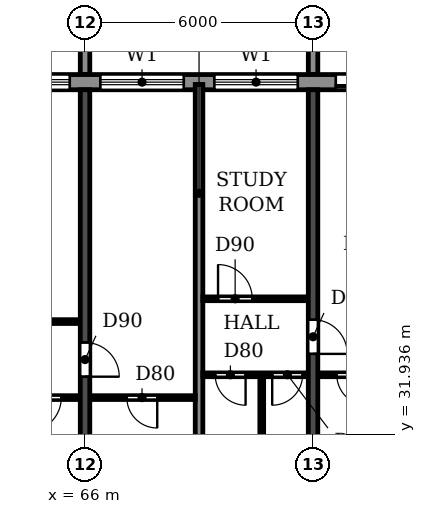
"""IFC4 building model, lengths in metres.
Left out: names, types, materials, properties, quantities, classifications, styles, units other than length and angle.
Written with IfcOpenShell. Run it as: python <this file> out.ifc"""

import sys

from ifc_helpers import new_model, si_unit, direction, frame, frame_2d, origin, place, context, subcontext, project, spatial, polyline, rectangle, outline, extrude, source, transform, mapped, element, fill, save


model = new_model("IFC4")
c1 = context("Model", 3, precision=1e-05, world=origin(), true_north=direction((0.0, 1.0)))
c2 = subcontext(c1, "Body", "Model", "MODEL_VIEW")
j1 = project(units=[si_unit("LENGTHUNIT", "METRE"), si_unit("PLANEANGLEUNIT", "RADIAN")], contexts=[c1])
p1 = place(None, origin())
s1 = spatial("IfcSite", under=j1, at=p1, CompositionType="ELEMENT")
p2 = place(p1, origin())
s2 = spatial("IfcBuilding", under=s1, at=p2, CompositionType="ELEMENT")
p3 = place(p2, frame((0.0, 0.0, 208.2)))
s3 = spatial("IfcBuildingStorey", under=s2, at=p3, CompositionType="ELEMENT", Elevation=208.2)
p4 = place(p3, frame((66.0, 30.5, 0.0), z_axis=(0.0, 0.0, 1.0), x_axis=(0.0, 1.0, 0.0)))
e1 = element("IfcWall", 1, at=p4, inside=s3, PredefinedType="SHEAR", context=c2, shape_type="SweptSolid", body=[
    extrude(rectangle(XDim=10.5, YDim=0.25, at=frame_2d((5.25, 0.0))), origin(), (0.0, 0.0, 1.0), 3.0),
])
p5 = place(p4, frame((2.95, 0.0, 0.0)))
e2 = element("IfcOpeningElement", 2, at=p5, cuts=e1, PredefinedType="OPENING", context=c2, shape_type="SweptSolid", body=[
    extrude(rectangle(XDim=0.9, YDim=2.1, at=frame_2d((0.45, 1.05))), frame((0.0, 0.135, 0.0), z_axis=(0.0, -1.0, 0.0), x_axis=(1.0, 0.0, 0.0)), (0.0, 0.0, 1.0), 0.27),
])
p6 = place(p3, frame((72.0, 30.5, 0.0), z_axis=(0.0, 0.0, 1.0), x_axis=(0.0, 1.0, 0.0)))
e3 = element("IfcWall", 3, at=p6, inside=s3, PredefinedType="SHEAR", context=c2, shape_type="SweptSolid", body=[
    extrude(rectangle(XDim=10.5, YDim=0.25, at=frame_2d((5.25, 0.0))), origin(), (0.0, 0.0, 1.0), 3.0),
])
p7 = place(p6, frame((3.55, 0.0, 0.0)))
e4 = element("IfcOpeningElement", 4, at=p7, cuts=e3, PredefinedType="OPENING", context=c2, shape_type="SweptSolid", body=[
    extrude(rectangle(XDim=0.9, YDim=2.1, at=frame_2d((0.45, 1.05))), frame((0.0, 0.135, 0.0), z_axis=(0.0, -1.0, 0.0), x_axis=(1.0, 0.0, 0.0)), (0.0, 0.0, 1.0), 0.27),
])
p8 = place(p3, frame((79.317, 41.2, 0.0), z_axis=(0.0, 0.0, 1.0), x_axis=(-1.0, 0.0, 0.0)))
e5 = element("IfcWall", 5, at=p8, inside=s3, PredefinedType="STANDARD", context=c2, shape_type="SweptSolid", body=[
    extrude(rectangle(XDim=56.634, YDim=0.4, at=frame_2d((28.317, 0.0))), origin(), (0.0, 0.0, 1.0), 3.0),
])
p9 = place(p8, frame((52.717, 0.0, 0.9)))
e6 = element("IfcOpeningElement", 6, at=p9, cuts=e5, PredefinedType="OPENING", context=c2, shape_type="SweptSolid", body=[
    extrude(rectangle(XDim=2.2, YDim=1.5, at=frame_2d((1.1, 0.75))), frame((0.0, 0.21, 0.0), z_axis=(0.0, -1.0, 0.0), x_axis=(1.0, 0.0, 0.0)), (0.0, 0.0, 1.0), 0.42),
])
p10 = place(p8, frame((49.917, 0.0, 0.0)))
e7 = element("IfcOpeningElement", 7, at=p10, cuts=e5, PredefinedType="OPENING", context=c2, shape_type="SweptSolid", body=[
    extrude(rectangle(XDim=1.8, YDim=2.4, at=frame_2d((0.9, 1.2))), frame((0.0, 0.21, 0.0), z_axis=(0.0, -1.0, 0.0), x_axis=(1.0, 0.0, 0.0)), (0.0, 0.0, 1.0), 0.42),
])
p11 = place(p8, frame((46.717, 0.0, 0.9)))
e8 = element("IfcOpeningElement", 8, at=p11, cuts=e5, PredefinedType="OPENING", context=c2, shape_type="SweptSolid", body=[
    extrude(rectangle(XDim=2.2, YDim=1.5, at=frame_2d((1.1, 0.75))), frame((0.0, 0.21, 0.0), z_axis=(0.0, -1.0, 0.0), x_axis=(1.0, 0.0, 0.0)), (0.0, 0.0, 1.0), 0.42),
])
p12 = place(p8, frame((43.917, 0.0, 0.0)))
e9 = element("IfcOpeningElement", 9, at=p12, cuts=e5, PredefinedType="OPENING", context=c2, shape_type="SweptSolid", body=[
    extrude(rectangle(XDim=1.8, YDim=2.4, at=frame_2d((0.9, 1.2))), frame((0.0, 0.21, 0.0), z_axis=(0.0, -1.0, 0.0), x_axis=(1.0, 0.0, 0.0)), (0.0, 0.0, 1.0), 0.42),
])
p13 = place(p8, frame((40.917, 0.0, 0.0)))
e10 = element("IfcOpeningElement", 10, at=p13, cuts=e5, PredefinedType="OPENING", context=c2, shape_type="SweptSolid", body=[
    extrude(rectangle(XDim=1.8, YDim=2.4, at=frame_2d((0.9, 1.2))), frame((0.0, 0.21, 0.0), z_axis=(0.0, -1.0, 0.0), x_axis=(1.0, 0.0, 0.0)), (0.0, 0.0, 1.0), 0.42),
])
p14 = place(p8, frame((37.717, 0.0, 0.9)))
e11 = element("IfcOpeningElement", 11, at=p14, cuts=e5, PredefinedType="OPENING", context=c2, shape_type="SweptSolid", body=[
    extrude(rectangle(XDim=2.2, YDim=1.5, at=frame_2d((1.1, 0.75))), frame((0.0, 0.21, 0.0), z_axis=(0.0, -1.0, 0.0), x_axis=(1.0, 0.0, 0.0)), (0.0, 0.0, 1.0), 0.42),
])
p15 = place(p8, frame((34.717, 0.0, 0.9)))
e12 = element("IfcOpeningElement", 12, at=p15, cuts=e5, PredefinedType="OPENING", context=c2, shape_type="SweptSolid", body=[
    extrude(rectangle(XDim=2.2, YDim=1.5, at=frame_2d((1.1, 0.75))), frame((0.0, 0.21, 0.0), z_axis=(0.0, -1.0, 0.0), x_axis=(1.0, 0.0, 0.0)), (0.0, 0.0, 1.0), 0.42),
])
p16 = place(p8, frame((31.717, 0.0, 0.9)))
e13 = element("IfcOpeningElement", 13, at=p16, cuts=e5, PredefinedType="OPENING", context=c2, shape_type="SweptSolid", body=[
    extrude(rectangle(XDim=2.2, YDim=1.5, at=frame_2d((1.1, 0.75))), frame((0.0, 0.21, 0.0), z_axis=(0.0, -1.0, 0.0), x_axis=(1.0, 0.0, 0.0)), (0.0, 0.0, 1.0), 0.42),
])
p17 = place(p8, frame((28.717, 0.0, 0.9)))
e14 = element("IfcOpeningElement", 14, at=p17, cuts=e5, PredefinedType="OPENING", context=c2, shape_type="SweptSolid", body=[
    extrude(rectangle(XDim=2.2, YDim=1.5, at=frame_2d((1.1, 0.75))), frame((0.0, 0.21, 0.0), z_axis=(0.0, -1.0, 0.0), x_axis=(1.0, 0.0, 0.0)), (0.0, 0.0, 1.0), 0.42),
])
p18 = place(p8, frame((25.917, 0.0, 0.0)))
e15 = element("IfcOpeningElement", 15, at=p18, cuts=e5, PredefinedType="OPENING", context=c2, shape_type="SweptSolid", body=[
    extrude(rectangle(XDim=1.8, YDim=2.4, at=frame_2d((0.9, 1.2))), frame((0.0, 0.21, 0.0), z_axis=(0.0, -1.0, 0.0), x_axis=(1.0, 0.0, 0.0)), (0.0, 0.0, 1.0), 0.42),
])
p19 = place(p8, frame((22.717, 0.0, 0.9)))
e16 = element("IfcOpeningElement", 16, at=p19, cuts=e5, PredefinedType="OPENING", context=c2, shape_type="SweptSolid", body=[
    extrude(rectangle(XDim=2.2, YDim=1.5, at=frame_2d((1.1, 0.75))), frame((0.0, 0.21, 0.0), z_axis=(0.0, -1.0, 0.0), x_axis=(1.0, 0.0, 0.0)), (0.0, 0.0, 1.0), 0.42),
])
p20 = place(p8, frame((19.717, 0.0, 0.9)))
e17 = element("IfcOpeningElement", 17, at=p20, cuts=e5, PredefinedType="OPENING", context=c2, shape_type="SweptSolid", body=[
    extrude(rectangle(XDim=2.2, YDim=1.5, at=frame_2d((1.1, 0.75))), frame((0.0, 0.21, 0.0), z_axis=(0.0, -1.0, 0.0), x_axis=(1.0, 0.0, 0.0)), (0.0, 0.0, 1.0), 0.42),
])
p21 = place(p8, frame((16.917, 0.0, 0.0)))
e18 = element("IfcOpeningElement", 18, at=p21, cuts=e5, PredefinedType="OPENING", context=c2, shape_type="SweptSolid", body=[
    extrude(rectangle(XDim=1.8, YDim=2.4, at=frame_2d((0.9, 1.2))), frame((0.0, 0.21, 0.0), z_axis=(0.0, -1.0, 0.0), x_axis=(1.0, 0.0, 0.0)), (0.0, 0.0, 1.0), 0.42),
])
p22 = place(p8, frame((13.717, 0.0, 0.9)))
e19 = element("IfcOpeningElement", 19, at=p22, cuts=e5, PredefinedType="OPENING", context=c2, shape_type="SweptSolid", body=[
    extrude(rectangle(XDim=2.2, YDim=1.5, at=frame_2d((1.1, 0.75))), frame((0.0, 0.21, 0.0), z_axis=(0.0, -1.0, 0.0), x_axis=(1.0, 0.0, 0.0)), (0.0, 0.0, 1.0), 0.42),
])
p23 = place(p8, frame((10.717, 0.0, 0.9)))
e20 = element("IfcOpeningElement", 20, at=p23, cuts=e5, PredefinedType="OPENING", context=c2, shape_type="SweptSolid", body=[
    extrude(rectangle(XDim=2.2, YDim=1.5, at=frame_2d((1.1, 0.75))), frame((0.0, 0.21, 0.0), z_axis=(0.0, -1.0, 0.0), x_axis=(1.0, 0.0, 0.0)), (0.0, 0.0, 1.0), 0.42),
])
p24 = place(p8, frame((7.717, 0.0, 0.9)))
e21 = element("IfcOpeningElement", 21, at=p24, cuts=e5, PredefinedType="OPENING", context=c2, shape_type="SweptSolid", body=[
    extrude(rectangle(XDim=2.2, YDim=1.5, at=frame_2d((1.1, 0.75))), frame((0.0, 0.21, 0.0), z_axis=(0.0, -1.0, 0.0), x_axis=(1.0, 0.0, 0.0)), (0.0, 0.0, 1.0), 0.42),
])
p25 = place(p8, frame((4.917, 0.0, 0.0)))
e22 = element("IfcOpeningElement", 22, at=p25, cuts=e5, PredefinedType="OPENING", context=c2, shape_type="SweptSolid", body=[
    extrude(rectangle(XDim=1.8, YDim=2.4, at=frame_2d((0.9, 1.2))), frame((0.0, 0.21, 0.0), z_axis=(0.0, -1.0, 0.0), x_axis=(1.0, 0.0, 0.0)), (0.0, 0.0, 1.0), 0.42),
])
p26 = place(p8, frame((1.717, 0.0, 0.9)))
e23 = element("IfcOpeningElement", 23, at=p26, cuts=e5, PredefinedType="OPENING", context=c2, shape_type="SweptSolid", body=[
    extrude(rectangle(XDim=2.2, YDim=1.5, at=frame_2d((1.1, 0.75))), frame((0.0, 0.21, 0.0), z_axis=(0.0, -1.0, 0.0), x_axis=(1.0, 0.0, 0.0)), (0.0, 0.0, 1.0), 0.42),
])
m1 = source(origin(), c2, "Body", "SweptSolid", [
    extrude(outline(polyline([(0.0, 0.0), (0.25, 0.0), (0.25, 3.1), (0.0, 3.1), (0.0, 0.0)])), origin(), (0.0, 0.0, 1.0), 3.1),
])
for number, where in (
    (24, (65.875, 41.4, 0.0)),
    (25, (71.875, 41.4, 0.0)),
):
    element("IfcWall", number, at=place(p3, frame(where)), inside=s3, PredefinedType="STANDARD", context=c2, shape_type="MappedRepresentation", body=[
        mapped(m1, transform((0.0, 0.0, 0.0))),
    ])
p27 = place(p3, frame((69.0, 30.51, 0.0), z_axis=(0.0, 0.0, 1.0), x_axis=(0.0, 1.0, 0.0)))
e26 = element("IfcWall", 26, at=p27, inside=s3, PredefinedType="PARTITIONING", context=c2, shape_type="SweptSolid", body=[
    extrude(rectangle(XDim=10.63, YDim=0.2, at=frame_2d((5.315, 0.0))), origin(), (0.0, 0.0, 1.0), 3.0),
])
p28 = place(p3, frame((63.8, 32.9, 0.0), z_axis=(0.0, 0.0, 1.0), x_axis=(1.0, 0.0, 0.0)))
e27 = element("IfcWall", 27, at=p28, inside=s3, PredefinedType="PARTITIONING", context=c2, shape_type="SweptSolid", body=[
    extrude(rectangle(XDim=2.065, YDim=0.1, at=frame_2d((1.032, 0.0))), origin(), (0.0, 0.0, 1.0), 3.0),
])
p29 = place(p28, frame((0.675, 0.0, 0.0)))
e28 = element("IfcOpeningElement", 28, at=p29, cuts=e27, PredefinedType="OPENING", context=c2, shape_type="SweptSolid", body=[
    extrude(rectangle(XDim=0.9, YDim=2.1, at=frame_2d((0.45, 1.05))), frame((0.0, 0.06, 0.0), z_axis=(0.0, -1.0, 0.0), x_axis=(1.0, 0.0, 0.0)), (0.0, 0.0, 1.0), 0.12),
])
p30 = place(p3, frame((66.135, 32.9, 0.0), z_axis=(0.0, 0.0, 1.0), x_axis=(1.0, 0.0, 0.0)))
e29 = element("IfcWall", 29, at=p30, inside=s3, PredefinedType="PARTITIONING", context=c2, shape_type="SweptSolid", body=[
    extrude(rectangle(XDim=2.765, YDim=0.1, at=frame_2d((1.382, 0.0))), origin(), (0.0, 0.0, 1.0), 3.0),
])
p31 = place(p30, frame((0.965, 0.0, 0.0)))
e30 = element("IfcOpeningElement", 30, at=p31, cuts=e29, PredefinedType="OPENING", context=c2, shape_type="SweptSolid", body=[
    extrude(rectangle(XDim=0.8, YDim=2.1, at=frame_2d((0.4, 1.05))), frame((0.0, 0.06, 0.0), z_axis=(0.0, -1.0, 0.0), x_axis=(1.0, 0.0, 0.0)), (0.0, 0.0, 1.0), 0.12),
])
p32 = place(p3, frame((69.1, 33.5, 0.0), z_axis=(0.0, 0.0, 1.0), x_axis=(1.0, 0.0, 0.0)))
e31 = element("IfcWall", 31, at=p32, inside=s3, PredefinedType="PARTITIONING", context=c2, shape_type="SweptSolid", body=[
    extrude(rectangle(XDim=2.765, YDim=0.1, at=frame_2d((1.382, 0.0))), origin(), (0.0, 0.0, 1.0), 3.0),
])
p33 = place(p32, frame((0.325, 0.0, 0.0)))
e32 = element("IfcOpeningElement", 32, at=p33, cuts=e31, PredefinedType="OPENING", context=c2, shape_type="SweptSolid", body=[
    extrude(rectangle(XDim=0.8, YDim=2.1, at=frame_2d((0.4, 1.05))), frame((0.0, 0.06, 0.0), z_axis=(0.0, -1.0, 0.0), x_axis=(1.0, 0.0, 0.0)), (0.0, 0.0, 1.0), 0.12),
])
p34 = place(p32, frame((1.825, 0.0, 0.0)))
e33 = element("IfcOpeningElement", 33, at=p34, cuts=e31, PredefinedType="OPENING", context=c2, shape_type="SweptSolid", body=[
    extrude(rectangle(XDim=0.8, YDim=2.1, at=frame_2d((0.4, 1.05))), frame((0.0, 0.06, 0.0), z_axis=(0.0, -1.0, 0.0), x_axis=(1.0, 0.0, 0.0)), (0.0, 0.0, 1.0), 0.12),
])
p35 = place(p3, frame((72.135, 33.5, 0.0), z_axis=(0.0, 0.0, 1.0), x_axis=(1.0, 0.0, 0.0)))
e34 = element("IfcWall", 34, at=p35, inside=s3, PredefinedType="PARTITIONING", context=c2, shape_type="SweptSolid", body=[
    extrude(rectangle(XDim=1.965, YDim=0.1, at=frame_2d((0.982, 0.0))), origin(), (0.0, 0.0, 1.0), 3.0),
])
p36 = place(p35, frame((0.49, 0.0, 0.0)))
e35 = element("IfcOpeningElement", 35, at=p36, cuts=e34, PredefinedType="OPENING", context=c2, shape_type="SweptSolid", body=[
    extrude(rectangle(XDim=0.8, YDim=2.1, at=frame_2d((0.4, 1.05))), frame((0.0, 0.06, 0.0), z_axis=(0.0, -1.0, 0.0), x_axis=(1.0, 0.0, 0.0)), (0.0, 0.0, 1.0), 0.12),
])
p37 = place(p3, frame((62.95, 34.9, 0.0), z_axis=(0.0, 0.0, 1.0), x_axis=(1.0, 0.0, 0.0)))
e36 = element("IfcWall", 36, at=p37, inside=s3, PredefinedType="PARTITIONING", context=c2, shape_type="SweptSolid", body=[
    extrude(rectangle(XDim=2.915, YDim=0.1, at=frame_2d((1.458, 0.0))), origin(), (0.0, 0.0, 1.0), 3.0),
])
p38 = place(p37, frame((0.55, 0.0, 0.0)))
e37 = element("IfcOpeningElement", 37, at=p38, cuts=e36, PredefinedType="OPENING", context=c2, shape_type="SweptSolid", body=[
    extrude(rectangle(XDim=0.9, YDim=2.1, at=frame_2d((0.45, 1.05))), frame((0.0, 0.06, 0.0), z_axis=(0.0, -1.0, 0.0), x_axis=(1.0, 0.0, 0.0)), (0.0, 0.0, 1.0), 0.12),
])
p39 = place(p3, frame((69.1, 35.5, 0.0), z_axis=(0.0, 0.0, 1.0), x_axis=(1.0, 0.0, 0.0)))
e38 = element("IfcWall", 38, at=p39, inside=s3, PredefinedType="PARTITIONING", context=c2, shape_type="SweptSolid", body=[
    extrude(rectangle(XDim=2.765, YDim=0.1, at=frame_2d((1.382, 0.0))), origin(), (0.0, 0.0, 1.0), 3.0),
])
p40 = place(p39, frame((0.4, 0.0, 0.0)))
e39 = element("IfcOpeningElement", 39, at=p40, cuts=e38, PredefinedType="OPENING", context=c2, shape_type="SweptSolid", body=[
    extrude(rectangle(XDim=0.9, YDim=2.1, at=frame_2d((0.45, 1.05))), frame((0.0, 0.06, 0.0), z_axis=(0.0, -1.0, 0.0), x_axis=(1.0, 0.0, 0.0)), (0.0, 0.0, 1.0), 0.12),
])
p41 = place(p3, frame((70.65, 30.51, 0.0), z_axis=(0.0, 0.0, 1.0), x_axis=(0.0, 1.0, 0.0)))
e40 = element("IfcWall", 40, at=p41, inside=s3, PredefinedType="PARTITIONING", context=c2, shape_type="SweptSolid", body=[
    extrude(rectangle(XDim=2.94, YDim=0.1, at=frame_2d((1.47, 0.0))), origin(), (0.0, 0.0, 1.0), 3.0),
])
p42 = place(p22, origin())
e41 = element("IfcWindow", 41, at=p42, inside=s3, PartitioningType="DOUBLE_PANEL_HORIZONTAL", PredefinedType="WINDOW", context=c2, shape_type="SweptSolid", body=[
    extrude(rectangle(XDim=2.2, YDim=1.5, at=frame_2d((1.1, 0.75))), frame((0.0, 0.03, 0.0), z_axis=(0.0, -1.0, 0.0), x_axis=(1.0, 0.0, 0.0)), (0.0, 0.0, 1.0), 0.06),
])
fill(e19, e41)
p43 = place(p23, origin())
e42 = element("IfcWindow", 42, at=p43, inside=s3, PartitioningType="DOUBLE_PANEL_HORIZONTAL", PredefinedType="WINDOW", context=c2, shape_type="SweptSolid", body=[
    extrude(rectangle(XDim=2.2, YDim=1.5, at=frame_2d((1.1, 0.75))), frame((0.0, 0.03, 0.0), z_axis=(0.0, -1.0, 0.0), x_axis=(1.0, 0.0, 0.0)), (0.0, 0.0, 1.0), 0.06),
])
fill(e20, e42)
p44 = place(p24, origin())
e43 = element("IfcWindow", 43, at=p44, inside=s3, PartitioningType="DOUBLE_PANEL_HORIZONTAL", PredefinedType="WINDOW", context=c2, shape_type="SweptSolid", body=[
    extrude(rectangle(XDim=2.2, YDim=1.5, at=frame_2d((1.1, 0.75))), frame((0.0, 0.03, 0.0), z_axis=(0.0, -1.0, 0.0), x_axis=(1.0, 0.0, 0.0)), (0.0, 0.0, 1.0), 0.06),
])
fill(e21, e43)
p45 = place(p25, origin())
e44 = element("IfcDoor", 44, at=p45, inside=s3, OperationType="DOUBLE_DOOR_SLIDING", PredefinedType="DOOR", context=c2, shape_type="SweptSolid", body=[
    extrude(rectangle(XDim=1.8, YDim=2.4, at=frame_2d((0.9, 1.2))), frame((0.0, 0.025, 0.0), z_axis=(0.0, -1.0, 0.0), x_axis=(1.0, 0.0, 0.0)), (0.0, 0.0, 1.0), 0.05),
])
fill(e22, e44)
p46 = place(p31, frame((0.8, 0.0, 0.0), z_axis=(0.0, 0.0, 1.0), x_axis=(-1.0, 0.0, 0.0)))
e45 = element("IfcDoor", 45, at=p46, inside=s3, OperationType="SINGLE_SWING_LEFT", PredefinedType="DOOR", context=c2, shape_type="SweptSolid", body=[
    extrude(rectangle(XDim=0.8, YDim=2.1, at=frame_2d((0.4, 1.05))), frame((0.0, 0.025, 0.0), z_axis=(0.0, -1.0, 0.0), x_axis=(1.0, 0.0, 0.0)), (0.0, 0.0, 1.0), 0.05),
])
fill(e30, e45)
p47 = place(p29, frame((0.9, 0.0, 0.0), z_axis=(0.0, 0.0, 1.0), x_axis=(-1.0, 0.0, 0.0)))
e46 = element("IfcDoor", 46, at=p47, inside=s3, OperationType="SINGLE_SWING_RIGHT", PredefinedType="DOOR", context=c2, shape_type="SweptSolid", body=[
    extrude(rectangle(XDim=0.9, YDim=2.1, at=frame_2d((0.45, 1.05))), frame((0.0, 0.025, 0.0), z_axis=(0.0, -1.0, 0.0), x_axis=(1.0, 0.0, 0.0)), (0.0, 0.0, 1.0), 0.05),
])
fill(e28, e46)
p48 = place(p5, frame((0.9, 0.0, 0.0), z_axis=(0.0, 0.0, 1.0), x_axis=(-1.0, 0.0, 0.0)))
e47 = element("IfcDoor", 47, at=p48, inside=s3, OperationType="SINGLE_SWING_RIGHT", PredefinedType="DOOR", context=c2, shape_type="SweptSolid", body=[
    extrude(rectangle(XDim=0.9, YDim=2.1, at=frame_2d((0.45, 1.05))), frame((0.0, 0.025, 0.0), z_axis=(0.0, -1.0, 0.0), x_axis=(1.0, 0.0, 0.0)), (0.0, 0.0, 1.0), 0.05),
])
fill(e2, e47)
p49 = place(p33, frame((0.8, 0.0, 0.0), z_axis=(0.0, 0.0, 1.0), x_axis=(-1.0, 0.0, 0.0)))
e48 = element("IfcDoor", 48, at=p49, inside=s3, OperationType="SINGLE_SWING_LEFT", PredefinedType="DOOR", context=c2, shape_type="SweptSolid", body=[
    extrude(rectangle(XDim=0.8, YDim=2.1, at=frame_2d((0.4, 1.05))), frame((0.0, 0.025, 0.0), z_axis=(0.0, -1.0, 0.0), x_axis=(1.0, 0.0, 0.0)), (0.0, 0.0, 1.0), 0.05),
])
fill(e32, e48)
p50 = place(p40, origin())
e49 = element("IfcDoor", 49, at=p50, inside=s3, OperationType="SINGLE_SWING_LEFT", PredefinedType="DOOR", context=c2, shape_type="SweptSolid", body=[
    extrude(rectangle(XDim=0.9, YDim=2.1, at=frame_2d((0.45, 1.05))), frame((0.0, 0.025, 0.0), z_axis=(0.0, -1.0, 0.0), x_axis=(1.0, 0.0, 0.0)), (0.0, 0.0, 1.0), 0.05),
])
fill(e39, e49)
p51 = place(p34, frame((0.8, 0.0, 0.0), z_axis=(0.0, 0.0, 1.0), x_axis=(-1.0, 0.0, 0.0)))
e50 = element("IfcDoor", 50, at=p51, inside=s3, OperationType="SINGLE_SWING_RIGHT", PredefinedType="DOOR", context=c2, shape_type="SweptSolid", body=[
    extrude(rectangle(XDim=0.8, YDim=2.1, at=frame_2d((0.4, 1.05))), frame((0.0, 0.025, 0.0), z_axis=(0.0, -1.0, 0.0), x_axis=(1.0, 0.0, 0.0)), (0.0, 0.0, 1.0), 0.05),
])
fill(e33, e50)
p52 = place(p7, frame((0.9, 0.0, 0.0), z_axis=(0.0, 0.0, 1.0), x_axis=(-1.0, 0.0, 0.0)))
e51 = element("IfcDoor", 51, at=p52, inside=s3, OperationType="SINGLE_SWING_RIGHT", PredefinedType="DOOR", context=c2, shape_type="SweptSolid", body=[
    extrude(rectangle(XDim=0.9, YDim=2.1, at=frame_2d((0.45, 1.05))), frame((0.0, 0.025, 0.0), z_axis=(0.0, -1.0, 0.0), x_axis=(1.0, 0.0, 0.0)), (0.0, 0.0, 1.0), 0.05),
])
fill(e4, e51)
p53 = place(p36, frame((0.8, 0.0, 0.0), z_axis=(0.0, 0.0, 1.0), x_axis=(-1.0, 0.0, 0.0)))
e52 = element("IfcDoor", 52, at=p53, inside=s3, OperationType="SINGLE_SWING_LEFT", PredefinedType="DOOR", context=c2, shape_type="SweptSolid", body=[
    extrude(rectangle(XDim=0.8, YDim=2.1, at=frame_2d((0.4, 1.05))), frame((0.0, 0.025, 0.0), z_axis=(0.0, -1.0, 0.0), x_axis=(1.0, 0.0, 0.0)), (0.0, 0.0, 1.0), 0.05),
])
fill(e35, e52)
save(model, sys.argv[1])
